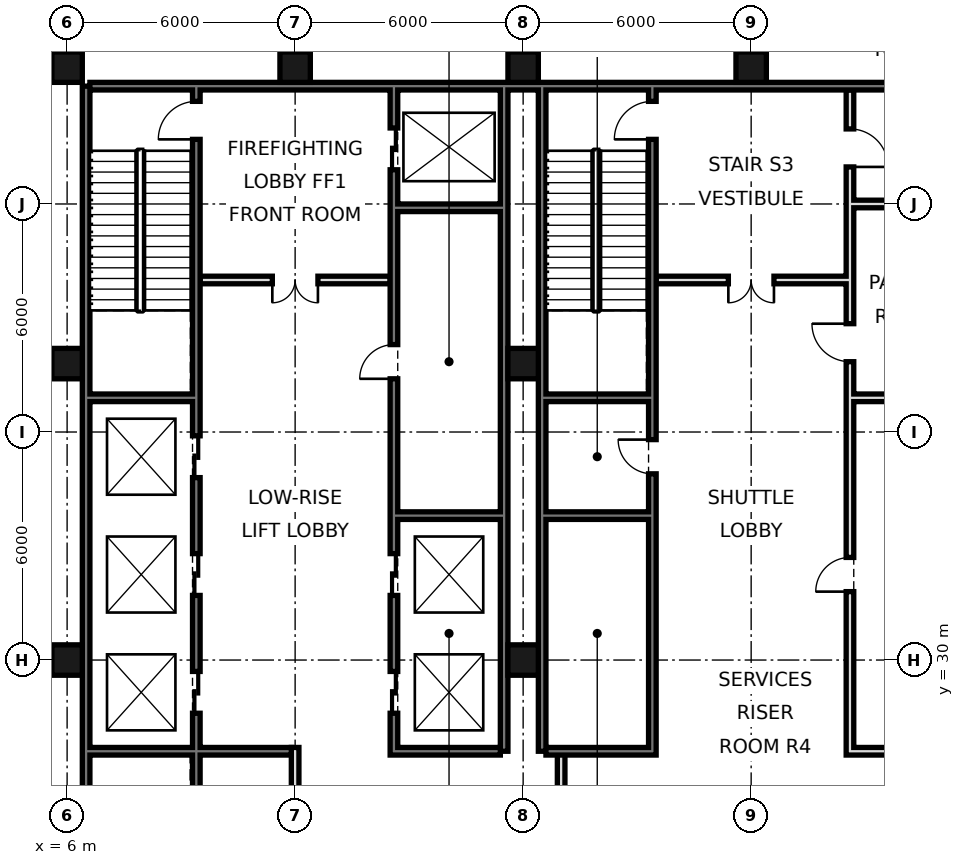
"""IFC4 building model, lengths in metres.
Left out: names, types, materials, properties, quantities, classifications, styles, units other than length and angle.
Written with IfcOpenShell. Run it as: python <this file> out.ifc"""

import sys

from ifc_helpers import new_model, si_unit, direction, frame, frame_2d, origin, origin_2d, place, context, subcontext, project, spatial, rectangle, hollow_rectangle, extrude, element, fill, save


model = new_model("IFC4")
c1 = context("Model", 3, precision=1e-05, world=origin(), true_north=direction((0.0, 1.0)))
c2 = subcontext(c1, "Body", "Model", "MODEL_VIEW")
j1 = project(units=[si_unit("LENGTHUNIT", "METRE"), si_unit("PLANEANGLEUNIT", "RADIAN")], contexts=[c1])
p1 = place(None, origin())
s1 = spatial("IfcSite", under=j1, at=p1, CompositionType="ELEMENT")
p2 = place(p1, origin())
s2 = spatial("IfcBuilding", under=s1, at=p2, CompositionType="ELEMENT")
p3 = place(p2, frame((0.0, 0.0, 15.0)))
s3 = spatial("IfcBuildingStorey", under=s2, at=p3, CompositionType="ELEMENT", Elevation=15.0)
for number, where, z_axis, x_axis in (
    (1, (6.0, 30.0, 0.0), (0.0, 0.0, 1.0), (1.0, 0.0, 0.0)),
    (2, (6.0, 37.8, 0.0), (0.0, 0.0, 1.0), (1.0, 0.0, 0.0)),
    (3, (6.0, 45.6, 0.0), (0.0, 0.0, 1.0), (1.0, 0.0, 0.0)),
    (4, (12.0, 45.6, 0.0), (0.0, 0.0, 1.0), (1.0, 0.0, 0.0)),
    (5, (18.0, 30.0, 0.0), (0.0, 0.0, 1.0), (1.0, 0.0, 0.0)),
    (6, (18.0, 37.8, 0.0), (0.0, 0.0, 1.0), (1.0, 0.0, 0.0)),
    (7, (18.0, 45.6, 0.0), (0.0, 0.0, 1.0), (1.0, 0.0, 0.0)),
    (8, (24.0, 45.6, 0.0), (0.0, 0.0, 1.0), (1.0, 0.0, 0.0)),
):
    element("IfcColumn", number, at=place(p3, frame(where, z_axis=z_axis, x_axis=x_axis)), inside=s3, PredefinedType="COLUMN", context=c2, shape_type="SweptSolid", body=[
        extrude(hollow_rectangle(XDim=0.8, YDim=0.8, WallThickness=0.07, at=origin_2d()), origin(), (0.0, 0.0, 1.0), 5.4),
    ])
p4 = place(p3, frame((6.5, 21.6, 0.0), z_axis=(0.0, 0.0, 1.0), x_axis=(0.0, 1.0, 0.0)))
e9 = element("IfcWall", 9, at=p4, inside=s3, PredefinedType="SOLIDWALL", context=c2, shape_type="SweptSolid", body=[
    extrude(rectangle(XDim=23.5, YDim=0.2, at=frame_2d((11.75, 0.0))), origin(), (0.0, 0.0, 1.0), 5.0),
])
p5 = place(p3, frame((6.6, 45.1, 0.0), z_axis=(0.0, 0.0, 1.0), x_axis=(1.0, 0.0, 0.0)))
e10 = element("IfcWall", 10, at=p5, inside=s3, PredefinedType="SOLIDWALL", context=c2, shape_type="SweptSolid", body=[
    extrude(rectangle(XDim=34.8, YDim=0.2, at=frame_2d((17.4, 0.0))), origin(), (0.0, 0.0, 1.0), 5.0),
])
for number, where, z_axis, x_axis in (
    (11, (17.5, 27.6, 0.0), (0.0, 0.0, 1.0), (0.0, 1.0, 0.0)),
    (12, (18.5, 27.6, 0.0), (0.0, 0.0, 1.0), (0.0, 1.0, 0.0)),
):
    element("IfcWall", number, at=place(p3, frame(where, z_axis=z_axis, x_axis=x_axis)), inside=s3, PredefinedType="SOLIDWALL", context=c2, shape_type="SweptSolid", body=[
        extrude(rectangle(XDim=17.5, YDim=0.2, at=frame_2d((8.75, 0.0))), origin(), (0.0, 0.0, 1.0), 5.0),
    ])
p6 = place(p3, frame((19.0, 21.6, 0.0), z_axis=(0.0, 0.0, 1.0), x_axis=(0.0, 1.0, 0.0)))
e13 = element("IfcWall", 13, at=p6, inside=s3, PredefinedType="PARTITIONING", context=c2, shape_type="SweptSolid", body=[
    extrude(rectangle(XDim=6.0, YDim=0.2, at=frame_2d((3.0, 0.0))), origin(), (0.0, 0.0, 1.0), 3.2),
])
p7 = place(p6, frame((2.1, 0.0, 0.0)))
e14 = element("IfcOpeningElement", 14, at=p7, cuts=e13, PredefinedType="OPENING", context=c2, shape_type="SweptSolid", body=[
    extrude(rectangle(XDim=1.8, YDim=2.1, at=frame_2d((0.9, 1.05))), frame((0.0, 0.11, 0.0), z_axis=(0.0, -1.0, 0.0), x_axis=(1.0, 0.0, 0.0)), (0.0, 0.0, 1.0), 0.22),
])
p8 = place(p3, frame((12.0, 21.6, 0.0), z_axis=(0.0, 0.0, 1.0), x_axis=(0.0, 1.0, 0.0)))
e15 = element("IfcWall", 15, at=p8, inside=s3, PredefinedType="PARTITIONING", context=c2, shape_type="SweptSolid", body=[
    extrude(rectangle(XDim=6.1, YDim=0.2, at=frame_2d((3.05, 0.0))), origin(), (0.0, 0.0, 1.0), 3.2),
])
p9 = place(p3, frame((14.6, 27.5, 0.0), z_axis=(0.0, 0.0, 1.0), x_axis=(0.0, 1.0, 0.0)))
e16 = element("IfcWall", 16, at=p9, inside=s3, PredefinedType="SOLIDWALL", context=c2, shape_type="SweptSolid", body=[
    extrude(rectangle(XDim=17.5, YDim=0.2, at=frame_2d((8.75, 0.0))), origin(), (0.0, 0.0, 1.0), 5.0),
])
p10 = place(p9, frame((1.1, 0.0, 0.0)))
e17 = element("IfcOpeningElement", 17, at=p10, cuts=e16, PredefinedType="OPENING", context=c2, shape_type="SweptSolid", body=[
    extrude(rectangle(XDim=1.1, YDim=2.1, at=frame_2d((0.55, 1.05))), frame((0.0, 0.11, 0.0), z_axis=(0.0, -1.0, 0.0), x_axis=(1.0, 0.0, 0.0)), (0.0, 0.0, 1.0), 0.22),
])
p11 = place(p9, frame((4.2, 0.0, 0.0)))
e18 = element("IfcOpeningElement", 18, at=p11, cuts=e16, PredefinedType="OPENING", context=c2, shape_type="SweptSolid", body=[
    extrude(rectangle(XDim=1.1, YDim=2.1, at=frame_2d((0.55, 1.05))), frame((0.0, 0.11, 0.0), z_axis=(0.0, -1.0, 0.0), x_axis=(1.0, 0.0, 0.0)), (0.0, 0.0, 1.0), 0.22),
])
p12 = place(p9, frame((15.4, 0.0, 0.0)))
e19 = element("IfcOpeningElement", 19, at=p12, cuts=e16, PredefinedType="OPENING", context=c2, shape_type="SweptSolid", body=[
    extrude(rectangle(XDim=1.1, YDim=2.1, at=frame_2d((0.55, 1.05))), frame((0.0, 0.11, 0.0), z_axis=(0.0, -1.0, 0.0), x_axis=(1.0, 0.0, 0.0)), (0.0, 0.0, 1.0), 0.22),
])
p13 = place(p9, frame((9.9, 0.0, 0.0)))
e20 = element("IfcOpeningElement", 20, at=p13, cuts=e16, PredefinedType="OPENING", context=c2, shape_type="SweptSolid", body=[
    extrude(rectangle(XDim=0.9, YDim=2.1, at=frame_2d((0.45, 1.05))), frame((0.0, 0.11, 0.0), z_axis=(0.0, -1.0, 0.0), x_axis=(1.0, 0.0, 0.0)), (0.0, 0.0, 1.0), 0.22),
])
p14 = place(p3, frame((21.4, 27.5, 0.0), z_axis=(0.0, 0.0, 1.0), x_axis=(0.0, 1.0, 0.0)))
e21 = element("IfcWall", 21, at=p14, inside=s3, PredefinedType="SOLIDWALL", context=c2, shape_type="SweptSolid", body=[
    extrude(rectangle(XDim=17.5, YDim=0.2, at=frame_2d((8.75, 0.0))), origin(), (0.0, 0.0, 1.0), 5.0),
])
p15 = place(p14, frame((16.2, 0.0, 0.0)))
e22 = element("IfcOpeningElement", 22, at=p15, cuts=e21, PredefinedType="OPENING", context=c2, shape_type="SweptSolid", body=[
    extrude(rectangle(XDim=1.0, YDim=2.1, at=frame_2d((0.5, 1.05))), frame((0.0, 0.11, 0.0), z_axis=(0.0, -1.0, 0.0), x_axis=(1.0, 0.0, 0.0)), (0.0, 0.0, 1.0), 0.22),
])
p16 = place(p14, frame((7.4, 0.0, 0.0)))
e23 = element("IfcOpeningElement", 23, at=p16, cuts=e21, PredefinedType="OPENING", context=c2, shape_type="SweptSolid", body=[
    extrude(rectangle(XDim=0.9, YDim=2.1, at=frame_2d((0.45, 1.05))), frame((0.0, 0.11, 0.0), z_axis=(0.0, -1.0, 0.0), x_axis=(1.0, 0.0, 0.0)), (0.0, 0.0, 1.0), 0.22),
])
p17 = place(p3, frame((26.6, 27.5, 0.0), z_axis=(0.0, 0.0, 1.0), x_axis=(0.0, 1.0, 0.0)))
e24 = element("IfcWall", 24, at=p17, inside=s3, PredefinedType="SOLIDWALL", context=c2, shape_type="SweptSolid", body=[
    extrude(rectangle(XDim=17.5, YDim=0.2, at=frame_2d((8.75, 0.0))), origin(), (0.0, 0.0, 1.0), 5.0),
])
p18 = place(p17, frame((4.3, 0.0, 0.0)))
e25 = element("IfcOpeningElement", 25, at=p18, cuts=e24, PredefinedType="OPENING", context=c2, shape_type="SweptSolid", body=[
    extrude(rectangle(XDim=0.9, YDim=2.1, at=frame_2d((0.45, 1.05))), frame((0.0, 0.11, 0.0), z_axis=(0.0, -1.0, 0.0), x_axis=(1.0, 0.0, 0.0)), (0.0, 0.0, 1.0), 0.22),
])
p19 = place(p17, frame((10.35, 0.0, 0.0)))
e26 = element("IfcOpeningElement", 26, at=p19, cuts=e24, PredefinedType="OPENING", context=c2, shape_type="SweptSolid", body=[
    extrude(rectangle(XDim=1.0, YDim=2.1, at=frame_2d((0.5, 1.05))), frame((0.0, 0.11, 0.0), z_axis=(0.0, -1.0, 0.0), x_axis=(1.0, 0.0, 0.0)), (0.0, 0.0, 1.0), 0.22),
])
p20 = place(p17, frame((15.475, 0.0, 0.0)))
e27 = element("IfcOpeningElement", 27, at=p20, cuts=e24, PredefinedType="OPENING", context=c2, shape_type="SweptSolid", body=[
    extrude(rectangle(XDim=1.0, YDim=2.1, at=frame_2d((0.5, 1.05))), frame((0.0, 0.11, 0.0), z_axis=(0.0, -1.0, 0.0), x_axis=(1.0, 0.0, 0.0)), (0.0, 0.0, 1.0), 0.22),
])
p21 = place(p3, frame((9.4, 21.6, 0.0), z_axis=(0.0, 0.0, 1.0), x_axis=(0.0, 1.0, 0.0)))
e28 = element("IfcWall", 28, at=p21, inside=s3, PredefinedType="SOLIDWALL", context=c2, shape_type="SweptSolid", body=[
    extrude(rectangle(XDim=23.4, YDim=0.2, at=frame_2d((11.7, 0.0))), origin(), (0.0, 0.0, 1.0), 3.2),
])
p22 = place(p21, frame((7.0, 0.0, 0.0)))
e29 = element("IfcOpeningElement", 29, at=p22, cuts=e28, PredefinedType="OPENING", context=c2, shape_type="SweptSolid", body=[
    extrude(rectangle(XDim=1.1, YDim=2.1, at=frame_2d((0.55, 1.05))), frame((0.0, 0.11, 0.0), z_axis=(0.0, -1.0, 0.0), x_axis=(1.0, 0.0, 0.0)), (0.0, 0.0, 1.0), 0.22),
])
p23 = place(p21, frame((10.1, 0.0, 0.0)))
e30 = element("IfcOpeningElement", 30, at=p23, cuts=e28, PredefinedType="OPENING", context=c2, shape_type="SweptSolid", body=[
    extrude(rectangle(XDim=1.1, YDim=2.1, at=frame_2d((0.55, 1.05))), frame((0.0, 0.11, 0.0), z_axis=(0.0, -1.0, 0.0), x_axis=(1.0, 0.0, 0.0)), (0.0, 0.0, 1.0), 0.22),
])
p24 = place(p21, frame((13.2, 0.0, 0.0)))
e31 = element("IfcOpeningElement", 31, at=p24, cuts=e28, PredefinedType="OPENING", context=c2, shape_type="SweptSolid", body=[
    extrude(rectangle(XDim=1.1, YDim=2.1, at=frame_2d((0.55, 1.05))), frame((0.0, 0.11, 0.0), z_axis=(0.0, -1.0, 0.0), x_axis=(1.0, 0.0, 0.0)), (0.0, 0.0, 1.0), 0.22),
])
p25 = place(p21, frame((22.1, 0.0, 0.0)))
e32 = element("IfcOpeningElement", 32, at=p25, cuts=e28, PredefinedType="OPENING", context=c2, shape_type="SweptSolid", body=[
    extrude(rectangle(XDim=1.0, YDim=2.1, at=frame_2d((0.5, 1.05))), frame((0.0, 0.11, 0.0), z_axis=(0.0, -1.0, 0.0), x_axis=(1.0, 0.0, 0.0)), (0.0, 0.0, 1.0), 0.22),
])
p26 = place(p21, frame((0.175, 0.0, 0.0)))
e33 = element("IfcOpeningElement", 33, at=p26, cuts=e28, PredefinedType="OPENING", context=c2, shape_type="SweptSolid", body=[
    extrude(rectangle(XDim=0.9, YDim=2.1, at=frame_2d((0.45, 1.05))), frame((0.0, 0.11, 0.0), z_axis=(0.0, -1.0, 0.0), x_axis=(1.0, 0.0, 0.0)), (0.0, 0.0, 1.0), 0.22),
])
for number, where, z_axis, x_axis in (
    (34, (14.7, 27.6, 0.0), (0.0, 0.0, 1.0), (1.0, 0.0, 0.0)),
    (35, (18.6, 27.6, 0.0), (0.0, 0.0, 1.0), (1.0, 0.0, 0.0)),
    (36, (26.7, 27.6, 0.0), (0.0, 0.0, 1.0), (1.0, 0.0, 0.0)),
):
    element("IfcWall", number, at=place(p3, frame(where, z_axis=z_axis, x_axis=x_axis)), inside=s3, PredefinedType="SOLIDWALL", context=c2, shape_type="SweptSolid", body=[
        extrude(rectangle(XDim=2.7, YDim=0.2, at=frame_2d((1.35, 0.0))), origin(), (0.0, 0.0, 1.0), 5.0),
    ])
p27 = place(p3, frame((6.6, 27.6, 0.0), z_axis=(0.0, 0.0, 1.0), x_axis=(1.0, 0.0, 0.0)))
e37 = element("IfcWall", 37, at=p27, inside=s3, PredefinedType="SOLIDWALL", context=c2, shape_type="SweptSolid", body=[
    extrude(rectangle(XDim=5.3, YDim=0.2, at=frame_2d((2.65, 0.0))), origin(), (0.0, 0.0, 1.0), 5.0),
])
for number, where, z_axis, x_axis in (
    (38, (14.7, 33.8, 0.0), (0.0, 0.0, 1.0), (1.0, 0.0, 0.0)),
    (39, (18.6, 33.8, 0.0), (0.0, 0.0, 1.0), (1.0, 0.0, 0.0)),
    (40, (18.6, 36.9, 0.0), (0.0, 0.0, 1.0), (1.0, 0.0, 0.0)),
    (41, (26.7, 36.9, 0.0), (0.0, 0.0, 1.0), (1.0, 0.0, 0.0)),
    (42, (6.6, 36.9, 0.0), (0.0, 0.0, 1.0), (1.0, 0.0, 0.0)),
):
    element("IfcWall", number, at=place(p3, frame(where, z_axis=z_axis, x_axis=x_axis)), inside=s3, PredefinedType="SOLIDWALL", context=c2, shape_type="SweptSolid", body=[
        extrude(rectangle(XDim=2.7, YDim=0.2, at=frame_2d((1.35, 0.0))), origin(), (0.0, 0.0, 1.0), 5.0),
    ])
p28 = place(p3, frame((21.5, 40.0, 0.0), z_axis=(0.0, 0.0, 1.0), x_axis=(1.0, 0.0, 0.0)))
e43 = element("IfcWall", 43, at=p28, inside=s3, PredefinedType="PARTITIONING", context=c2, shape_type="SweptSolid", body=[
    extrude(rectangle(XDim=5.0, YDim=0.2, at=frame_2d((2.5, 0.0))), origin(), (0.0, 0.0, 1.0), 5.0),
])
p29 = place(p28, frame((1.9, 0.0, 0.0)))
e44 = element("IfcOpeningElement", 44, at=p29, cuts=e43, PredefinedType="OPENING", context=c2, shape_type="SweptSolid", body=[
    extrude(rectangle(XDim=1.2, YDim=2.1, at=frame_2d((0.6, 1.05))), frame((0.0, 0.11, 0.0), z_axis=(0.0, -1.0, 0.0), x_axis=(1.0, 0.0, 0.0)), (0.0, 0.0, 1.0), 0.22),
])
p30 = place(p3, frame((9.5, 40.0, 0.0), z_axis=(0.0, 0.0, 1.0), x_axis=(1.0, 0.0, 0.0)))
e45 = element("IfcWall", 45, at=p30, inside=s3, PredefinedType="PARTITIONING", context=c2, shape_type="SweptSolid", body=[
    extrude(rectangle(XDim=5.0, YDim=0.2, at=frame_2d((2.5, 0.0))), origin(), (0.0, 0.0, 1.0), 5.0),
])
p31 = place(p30, frame((1.9, 0.0, 0.0)))
e46 = element("IfcOpeningElement", 46, at=p31, cuts=e45, PredefinedType="OPENING", context=c2, shape_type="SweptSolid", body=[
    extrude(rectangle(XDim=1.2, YDim=2.1, at=frame_2d((0.6, 1.05))), frame((0.0, 0.11, 0.0), z_axis=(0.0, -1.0, 0.0), x_axis=(1.0, 0.0, 0.0)), (0.0, 0.0, 1.0), 0.22),
])
p32 = place(p3, frame((14.7, 41.9, 0.0), z_axis=(0.0, 0.0, 1.0), x_axis=(1.0, 0.0, 0.0)))
e47 = element("IfcWall", 47, at=p32, inside=s3, PredefinedType="SOLIDWALL", context=c2, shape_type="SweptSolid", body=[
    extrude(rectangle(XDim=2.7, YDim=0.2, at=frame_2d((1.35, 0.0))), origin(), (0.0, 0.0, 1.0), 5.0),
])
p33 = place(p3, frame((26.7, 42.0, 0.0), z_axis=(0.0, 0.0, 1.0), x_axis=(1.0, 0.0, 0.0)))
e48 = element("IfcWall", 48, at=p33, inside=s3, PredefinedType="PARTITIONING", context=c2, shape_type="SweptSolid", body=[
    extrude(rectangle(XDim=2.7, YDim=0.2, at=frame_2d((1.35, 0.0))), origin(), (0.0, 0.0, 1.0), 5.0),
])
p34 = place(p31, frame((1.2, 0.0, 0.0), z_axis=(0.0, 0.0, 1.0), x_axis=(-1.0, 0.0, 0.0)))
e49 = element("IfcDoor", 49, at=p34, inside=s3, OperationType="DOUBLE_DOOR_SINGLE_SWING", PredefinedType="DOOR", context=c2, shape_type="SweptSolid", body=[
    extrude(rectangle(XDim=1.2, YDim=2.1, at=frame_2d((0.6, 1.05))), frame((0.0, 0.025, 0.0), z_axis=(0.0, -1.0, 0.0), x_axis=(1.0, 0.0, 0.0)), (0.0, 0.0, 1.0), 0.05),
])
fill(e46, e49)
p35 = place(p29, frame((1.2, 0.0, 0.0), z_axis=(0.0, 0.0, 1.0), x_axis=(-1.0, 0.0, 0.0)))
e50 = element("IfcDoor", 50, at=p35, inside=s3, OperationType="DOUBLE_DOOR_SINGLE_SWING", PredefinedType="DOOR", context=c2, shape_type="SweptSolid", body=[
    extrude(rectangle(XDim=1.2, YDim=2.1, at=frame_2d((0.6, 1.05))), frame((0.0, 0.025, 0.0), z_axis=(0.0, -1.0, 0.0), x_axis=(1.0, 0.0, 0.0)), (0.0, 0.0, 1.0), 0.05),
])
fill(e44, e50)
p36 = place(p10, origin())
e51 = element("IfcDoor", 51, at=p36, inside=s3, OperationType="DOUBLE_DOOR_SLIDING", PredefinedType="DOOR", context=c2, shape_type="SweptSolid", body=[
    extrude(rectangle(XDim=1.1, YDim=2.1, at=frame_2d((0.55, 1.05))), frame((0.0, 0.025, 0.0), z_axis=(0.0, -1.0, 0.0), x_axis=(1.0, 0.0, 0.0)), (0.0, 0.0, 1.0), 0.05),
])
fill(e17, e51)
p37 = place(p11, origin())
e52 = element("IfcDoor", 52, at=p37, inside=s3, OperationType="DOUBLE_DOOR_SLIDING", PredefinedType="DOOR", context=c2, shape_type="SweptSolid", body=[
    extrude(rectangle(XDim=1.1, YDim=2.1, at=frame_2d((0.55, 1.05))), frame((0.0, 0.025, 0.0), z_axis=(0.0, -1.0, 0.0), x_axis=(1.0, 0.0, 0.0)), (0.0, 0.0, 1.0), 0.05),
])
fill(e18, e52)
p38 = place(p12, origin())
e53 = element("IfcDoor", 53, at=p38, inside=s3, OperationType="DOUBLE_DOOR_SLIDING", PredefinedType="DOOR", context=c2, shape_type="SweptSolid", body=[
    extrude(rectangle(XDim=1.1, YDim=2.1, at=frame_2d((0.55, 1.05))), frame((0.0, 0.025, 0.0), z_axis=(0.0, -1.0, 0.0), x_axis=(1.0, 0.0, 0.0)), (0.0, 0.0, 1.0), 0.05),
])
fill(e19, e53)
p39 = place(p22, origin())
e54 = element("IfcDoor", 54, at=p39, inside=s3, OperationType="DOUBLE_DOOR_SLIDING", PredefinedType="DOOR", context=c2, shape_type="SweptSolid", body=[
    extrude(rectangle(XDim=1.1, YDim=2.1, at=frame_2d((0.55, 1.05))), frame((0.0, 0.025, 0.0), z_axis=(0.0, -1.0, 0.0), x_axis=(1.0, 0.0, 0.0)), (0.0, 0.0, 1.0), 0.05),
])
fill(e29, e54)
p40 = place(p23, origin())
e55 = element("IfcDoor", 55, at=p40, inside=s3, OperationType="DOUBLE_DOOR_SLIDING", PredefinedType="DOOR", context=c2, shape_type="SweptSolid", body=[
    extrude(rectangle(XDim=1.1, YDim=2.1, at=frame_2d((0.55, 1.05))), frame((0.0, 0.025, 0.0), z_axis=(0.0, -1.0, 0.0), x_axis=(1.0, 0.0, 0.0)), (0.0, 0.0, 1.0), 0.05),
])
fill(e30, e55)
p41 = place(p24, origin())
e56 = element("IfcDoor", 56, at=p41, inside=s3, OperationType="DOUBLE_DOOR_SLIDING", PredefinedType="DOOR", context=c2, shape_type="SweptSolid", body=[
    extrude(rectangle(XDim=1.1, YDim=2.1, at=frame_2d((0.55, 1.05))), frame((0.0, 0.025, 0.0), z_axis=(0.0, -1.0, 0.0), x_axis=(1.0, 0.0, 0.0)), (0.0, 0.0, 1.0), 0.05),
])
fill(e31, e56)
p42 = place(p25, origin())
e57 = element("IfcDoor", 57, at=p42, inside=s3, OperationType="SINGLE_SWING_LEFT", PredefinedType="DOOR", context=c2, shape_type="SweptSolid", body=[
    extrude(rectangle(XDim=1.0, YDim=2.1, at=frame_2d((0.5, 1.05))), frame((0.0, 0.025, 0.0), z_axis=(0.0, -1.0, 0.0), x_axis=(1.0, 0.0, 0.0)), (0.0, 0.0, 1.0), 0.05),
])
fill(e32, e57)
p43 = place(p15, origin())
e58 = element("IfcDoor", 58, at=p43, inside=s3, OperationType="SINGLE_SWING_LEFT", PredefinedType="DOOR", context=c2, shape_type="SweptSolid", body=[
    extrude(rectangle(XDim=1.0, YDim=2.1, at=frame_2d((0.5, 1.05))), frame((0.0, 0.025, 0.0), z_axis=(0.0, -1.0, 0.0), x_axis=(1.0, 0.0, 0.0)), (0.0, 0.0, 1.0), 0.05),
])
fill(e22, e58)
p44 = place(p13, origin())
e59 = element("IfcDoor", 59, at=p44, inside=s3, OperationType="SINGLE_SWING_LEFT", PredefinedType="DOOR", context=c2, shape_type="SweptSolid", body=[
    extrude(rectangle(XDim=0.9, YDim=2.1, at=frame_2d((0.45, 1.05))), frame((0.0, 0.025, 0.0), z_axis=(0.0, -1.0, 0.0), x_axis=(1.0, 0.0, 0.0)), (0.0, 0.0, 1.0), 0.05),
])
fill(e20, e59)
p45 = place(p16, frame((0.9, 0.0, 0.0), z_axis=(0.0, 0.0, 1.0), x_axis=(-1.0, 0.0, 0.0)))
e60 = element("IfcDoor", 60, at=p45, inside=s3, OperationType="SINGLE_SWING_LEFT", PredefinedType="DOOR", context=c2, shape_type="SweptSolid", body=[
    extrude(rectangle(XDim=0.9, YDim=2.1, at=frame_2d((0.45, 1.05))), frame((0.0, 0.025, 0.0), z_axis=(0.0, -1.0, 0.0), x_axis=(1.0, 0.0, 0.0)), (0.0, 0.0, 1.0), 0.05),
])
fill(e23, e60)
p46 = place(p18, origin())
e61 = element("IfcDoor", 61, at=p46, inside=s3, OperationType="SINGLE_SWING_LEFT", PredefinedType="DOOR", context=c2, shape_type="SweptSolid", body=[
    extrude(rectangle(XDim=0.9, YDim=2.1, at=frame_2d((0.45, 1.05))), frame((0.0, 0.025, 0.0), z_axis=(0.0, -1.0, 0.0), x_axis=(1.0, 0.0, 0.0)), (0.0, 0.0, 1.0), 0.05),
])
fill(e25, e61)
p47 = place(p19, frame((1.0, 0.0, 0.0), z_axis=(0.0, 0.0, 1.0), x_axis=(-1.0, 0.0, 0.0)))
e62 = element("IfcDoor", 62, at=p47, inside=s3, OperationType="SINGLE_SWING_LEFT", PredefinedType="DOOR", context=c2, shape_type="SweptSolid", body=[
    extrude(rectangle(XDim=1.0, YDim=2.1, at=frame_2d((0.5, 1.05))), frame((0.0, 0.025, 0.0), z_axis=(0.0, -1.0, 0.0), x_axis=(1.0, 0.0, 0.0)), (0.0, 0.0, 1.0), 0.05),
])
fill(e26, e62)
p48 = place(p20, frame((1.0, 0.0, 0.0), z_axis=(0.0, 0.0, 1.0), x_axis=(-1.0, 0.0, 0.0)))
e63 = element("IfcDoor", 63, at=p48, inside=s3, OperationType="SINGLE_SWING_RIGHT", PredefinedType="DOOR", context=c2, shape_type="SweptSolid", body=[
    extrude(rectangle(XDim=1.0, YDim=2.1, at=frame_2d((0.5, 1.05))), frame((0.0, 0.025, 0.0), z_axis=(0.0, -1.0, 0.0), x_axis=(1.0, 0.0, 0.0)), (0.0, 0.0, 1.0), 0.05),
])
fill(e27, e63)
save(model, sys.argv[1])
